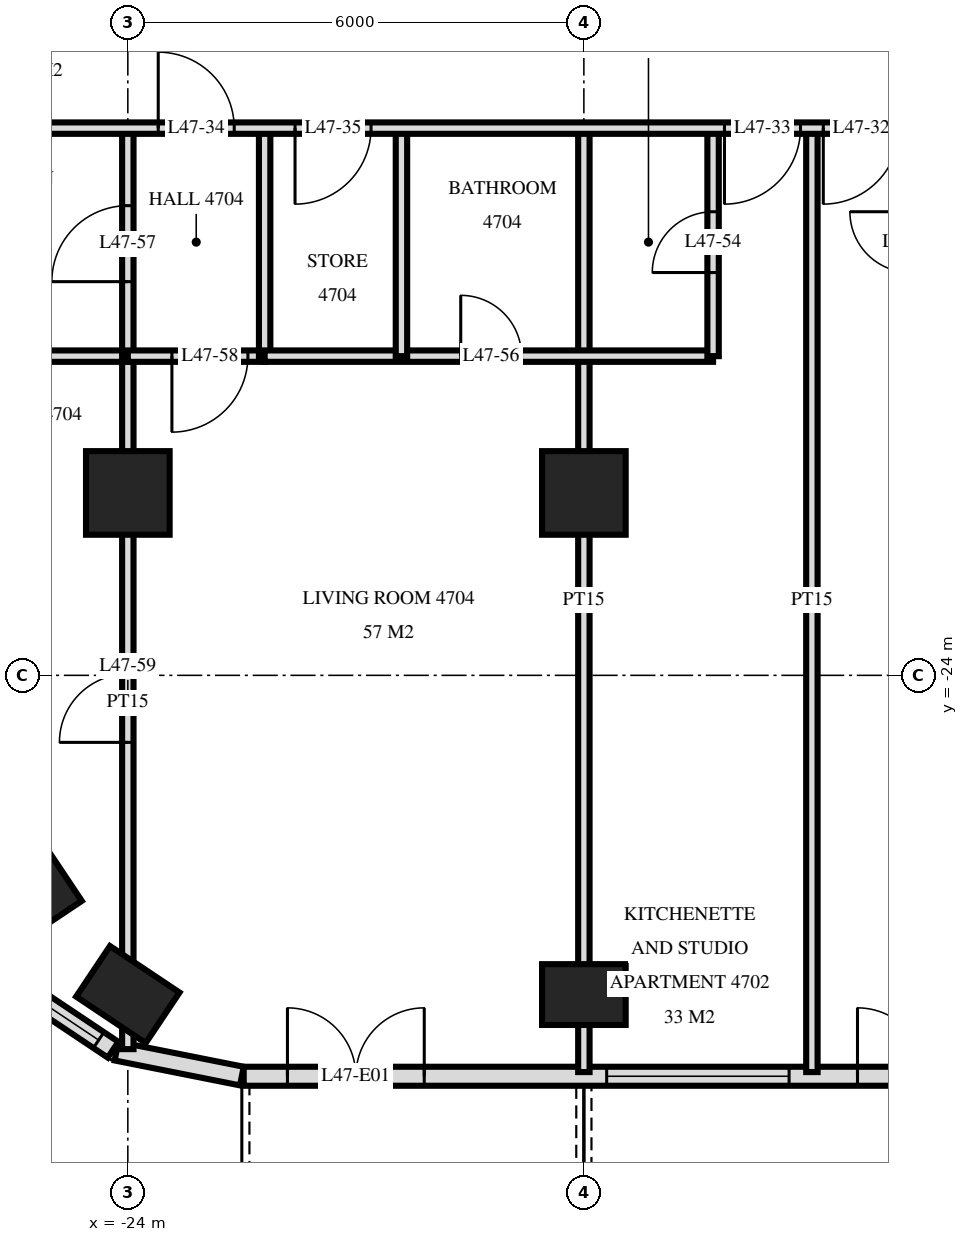
"""IFC4 building model, lengths in metres.
Left out: names, types, materials, properties, quantities, classifications, styles, units other than length and angle.
Written with IfcOpenShell. Run it as: python <this file> out.ifc"""

import sys

from ifc_helpers import new_model, si_unit, direction, frame, frame_2d, origin, origin_2d, place, context, subcontext, project, spatial, rectangle, extrude, element, fill, save


model = new_model("IFC4")
c1 = context("Model", 3, precision=1e-05, world=origin(), true_north=direction((0.0, 1.0)))
c2 = subcontext(c1, "Body", "Model", "MODEL_VIEW")
j1 = project(units=[si_unit("LENGTHUNIT", "METRE"), si_unit("PLANEANGLEUNIT", "RADIAN")], contexts=[c1])
p1 = place(None, origin())
s1 = spatial("IfcSite", under=j1, at=p1, CompositionType="ELEMENT")
p2 = place(p1, origin())
s2 = spatial("IfcBuilding", under=s1, at=p2, CompositionType="ELEMENT")
p3 = place(p2, frame((0.0, 0.0, 183.6)))
s3 = spatial("IfcBuildingStorey", under=s2, at=p3, CompositionType="ELEMENT", Elevation=183.6)
for number, where, z_axis, x_axis in (
    (1, (-25.244, -26.733, -0.28), (0.0, 0.0, 1.0), (-0.556, 0.831, 0.0)),
    (2, (-24.0, -28.2, -0.28), (0.0, 0.0, 1.0), (-0.831, 0.556, 0.0)),
):
    element("IfcColumn", number, at=place(p3, frame(where, z_axis=z_axis, x_axis=x_axis)), inside=s3, PredefinedType="COLUMN", context=c2, shape_type="SweptSolid", body=[
        extrude(rectangle(XDim=1.1, YDim=0.8, at=origin_2d()), origin(), (0.0, 0.0, 1.0), 3.78),
    ])
p4 = place(p3, frame((-24.0, -21.6, -0.28), z_axis=(0.0, 0.0, 1.0), x_axis=(1.0, 0.0, 0.0)))
e3 = element("IfcColumn", 3, at=p4, inside=s3, PredefinedType="COLUMN", context=c2, shape_type="SweptSolid", body=[
    extrude(rectangle(XDim=1.1, YDim=1.1, at=origin_2d()), origin(), (0.0, 0.0, 1.0), 3.78),
])
p5 = place(p3, frame((-18.0, -28.2, -0.28), z_axis=(0.0, 0.0, 1.0), x_axis=(1.0, 0.0, 0.0)))
e4 = element("IfcColumn", 4, at=p5, inside=s3, PredefinedType="COLUMN", context=c2, shape_type="SweptSolid", body=[
    extrude(rectangle(XDim=1.1, YDim=0.8, at=origin_2d()), origin(), (0.0, 0.0, 1.0), 3.78),
])
p6 = place(p3, frame((-18.0, -21.6, -0.28), z_axis=(0.0, 0.0, 1.0), x_axis=(1.0, 0.0, 0.0)))
e5 = element("IfcColumn", 5, at=p6, inside=s3, PredefinedType="COLUMN", context=c2, shape_type="SweptSolid", body=[
    extrude(rectangle(XDim=1.1, YDim=1.1, at=origin_2d()), origin(), (0.0, 0.0, 1.0), 3.78),
])
p7 = place(p3, frame((-25.571, -28.006, 0.0), z_axis=(0.0, 0.0, 1.0), x_axis=(0.831482937015, -0.55555029066, 0.0)))
e6 = element("IfcWall", 6, at=p7, inside=s3, PredefinedType="SOLIDWALL", context=c2, shape_type="SweptSolid", body=[
    extrude(rectangle(XDim=1.656, YDim=0.25, at=frame_2d((0.828, 0.0))), origin(), (0.0, 0.0, 1.0), 3.22),
])
p8 = place(p7, frame((0.228, 0.0, 0.9)))
e7 = element("IfcOpeningElement", 7, at=p8, cuts=e6, PredefinedType="OPENING", context=c2, shape_type="SweptSolid", body=[
    extrude(rectangle(XDim=1.2, YDim=1.5, at=frame_2d((0.6, 0.75))), frame((0.0, 0.135, 0.0), z_axis=(0.0, -1.0, 0.0), x_axis=(1.0, 0.0, 0.0)), (0.0, 0.0, 1.0), 0.27),
])
p9 = place(p3, frame((-24.149, -28.945, 0.0), z_axis=(0.0, 0.0, 1.0), x_axis=(0.980775640221, -0.19513878023, 0.0)))
e8 = element("IfcWall", 8, at=p9, inside=s3, PredefinedType="SOLIDWALL", context=c2, shape_type="SweptSolid", body=[
    extrude(rectangle(XDim=1.681, YDim=0.25, at=frame_2d((0.841, 0.0))), origin(), (0.0, 0.0, 1.0), 3.22),
])
p10 = place(p3, frame((-22.475, -29.275, 0.0), z_axis=(0.0, 0.0, 1.0), x_axis=(1.0, 0.0, 0.0)))
e9 = element("IfcWall", 9, at=p10, inside=s3, PredefinedType="SOLIDWALL", context=c2, shape_type="SweptSolid", body=[
    extrude(rectangle(XDim=44.951, YDim=0.25, at=frame_2d((22.475, 0.0))), origin(), (0.0, 0.0, 1.0), 3.22),
])
p11 = place(p10, frame((0.575, 0.0, 0.0)))
e10 = element("IfcOpeningElement", 10, at=p11, cuts=e9, PredefinedType="OPENING", context=c2, shape_type="SweptSolid", body=[
    extrude(rectangle(XDim=1.8, YDim=2.4, at=frame_2d((0.9, 1.2))), frame((0.0, 0.135, 0.0), z_axis=(0.0, -1.0, 0.0), x_axis=(1.0, 0.0, 0.0)), (0.0, 0.0, 1.0), 0.27),
])
p12 = place(p10, frame((4.775, 0.0, 0.9)))
e11 = element("IfcOpeningElement", 11, at=p12, cuts=e9, PredefinedType="OPENING", context=c2, shape_type="SweptSolid", body=[
    extrude(rectangle(XDim=2.4, YDim=1.5, at=frame_2d((1.2, 0.75))), frame((0.0, 0.135, 0.0), z_axis=(0.0, -1.0, 0.0), x_axis=(1.0, 0.0, 0.0)), (0.0, 0.0, 1.0), 0.27),
])
p13 = place(p10, frame((8.075, 0.0, 0.0)))
e12 = element("IfcOpeningElement", 12, at=p13, cuts=e9, PredefinedType="OPENING", context=c2, shape_type="SweptSolid", body=[
    extrude(rectangle(XDim=1.8, YDim=2.4, at=frame_2d((0.9, 1.2))), frame((0.0, 0.135, 0.0), z_axis=(0.0, -1.0, 0.0), x_axis=(1.0, 0.0, 0.0)), (0.0, 0.0, 1.0), 0.27),
])
p14 = place(p10, frame((11.075, 0.0, 0.0)))
e13 = element("IfcOpeningElement", 13, at=p14, cuts=e9, PredefinedType="OPENING", context=c2, shape_type="SweptSolid", body=[
    extrude(rectangle(XDim=1.8, YDim=2.4, at=frame_2d((0.9, 1.2))), frame((0.0, 0.135, 0.0), z_axis=(0.0, -1.0, 0.0), x_axis=(1.0, 0.0, 0.0)), (0.0, 0.0, 1.0), 0.27),
])
p15 = place(p10, frame((13.775, 0.0, 0.9)))
e14 = element("IfcOpeningElement", 14, at=p15, cuts=e9, PredefinedType="OPENING", context=c2, shape_type="SweptSolid", body=[
    extrude(rectangle(XDim=2.4, YDim=1.5, at=frame_2d((1.2, 0.75))), frame((0.0, 0.135, 0.0), z_axis=(0.0, -1.0, 0.0), x_axis=(1.0, 0.0, 0.0)), (0.0, 0.0, 1.0), 0.27),
])
p16 = place(p10, frame((20.075, 0.0, 0.0)))
e15 = element("IfcOpeningElement", 15, at=p16, cuts=e9, PredefinedType="OPENING", context=c2, shape_type="SweptSolid", body=[
    extrude(rectangle(XDim=1.8, YDim=2.4, at=frame_2d((0.9, 1.2))), frame((0.0, 0.135, 0.0), z_axis=(0.0, -1.0, 0.0), x_axis=(1.0, 0.0, 0.0)), (0.0, 0.0, 1.0), 0.27),
])
p17 = place(p10, frame((23.075, 0.0, 0.0)))
e16 = element("IfcOpeningElement", 16, at=p17, cuts=e9, PredefinedType="OPENING", context=c2, shape_type="SweptSolid", body=[
    extrude(rectangle(XDim=1.8, YDim=2.4, at=frame_2d((0.9, 1.2))), frame((0.0, 0.135, 0.0), z_axis=(0.0, -1.0, 0.0), x_axis=(1.0, 0.0, 0.0)), (0.0, 0.0, 1.0), 0.27),
])
p18 = place(p10, frame((29.075, 0.0, 0.0)))
e17 = element("IfcOpeningElement", 17, at=p18, cuts=e9, PredefinedType="OPENING", context=c2, shape_type="SweptSolid", body=[
    extrude(rectangle(XDim=1.8, YDim=2.4, at=frame_2d((0.9, 1.2))), frame((0.0, 0.135, 0.0), z_axis=(0.0, -1.0, 0.0), x_axis=(1.0, 0.0, 0.0)), (0.0, 0.0, 1.0), 0.27),
])
p19 = place(p10, frame((31.775, 0.0, 0.9)))
e18 = element("IfcOpeningElement", 18, at=p19, cuts=e9, PredefinedType="OPENING", context=c2, shape_type="SweptSolid", body=[
    extrude(rectangle(XDim=2.4, YDim=1.5, at=frame_2d((1.2, 0.75))), frame((0.0, 0.135, 0.0), z_axis=(0.0, -1.0, 0.0), x_axis=(1.0, 0.0, 0.0)), (0.0, 0.0, 1.0), 0.27),
])
p20 = place(p10, frame((35.075, 0.0, 0.0)))
e19 = element("IfcOpeningElement", 19, at=p20, cuts=e9, PredefinedType="OPENING", context=c2, shape_type="SweptSolid", body=[
    extrude(rectangle(XDim=1.8, YDim=2.4, at=frame_2d((0.9, 1.2))), frame((0.0, 0.135, 0.0), z_axis=(0.0, -1.0, 0.0), x_axis=(1.0, 0.0, 0.0)), (0.0, 0.0, 1.0), 0.27),
])
p21 = place(p10, frame((37.775, 0.0, 0.9)))
e20 = element("IfcOpeningElement", 20, at=p21, cuts=e9, PredefinedType="OPENING", context=c2, shape_type="SweptSolid", body=[
    extrude(rectangle(XDim=2.4, YDim=1.5, at=frame_2d((1.2, 0.75))), frame((0.0, 0.135, 0.0), z_axis=(0.0, -1.0, 0.0), x_axis=(1.0, 0.0, 0.0)), (0.0, 0.0, 1.0), 0.27),
])
p22 = place(p10, frame((41.075, 0.0, 0.0)))
e21 = element("IfcOpeningElement", 21, at=p22, cuts=e9, PredefinedType="OPENING", context=c2, shape_type="SweptSolid", body=[
    extrude(rectangle(XDim=1.8, YDim=2.4, at=frame_2d((0.9, 1.2))), frame((0.0, 0.135, 0.0), z_axis=(0.0, -1.0, 0.0), x_axis=(1.0, 0.0, 0.0)), (0.0, 0.0, 1.0), 0.27),
])
p23 = place(p3, frame((-15.0, -29.22, 0.0), z_axis=(0.0, 0.0, 1.0), x_axis=(0.0, 1.0, 0.0)))
e22 = element("IfcWall", 22, at=p23, inside=s3, PredefinedType="PARTITIONING", context=c2, shape_type="SweptSolid", body=[
    extrude(rectangle(XDim=12.42, YDim=0.15, at=frame_2d((6.21, 0.0))), origin(), (0.0, 0.0, 1.0), 3.22),
])
p24 = place(p3, frame((-16.3, -19.8, 0.0), z_axis=(0.0, 0.0, 1.0), x_axis=(0.0, 1.0, 0.0)))
e23 = element("IfcWall", 23, at=p24, inside=s3, PredefinedType="PARTITIONING", context=c2, shape_type="SweptSolid", body=[
    extrude(rectangle(XDim=3.0, YDim=0.15, at=frame_2d((1.5, 0.0))), origin(), (0.0, 0.0, 1.0), 3.22),
])
p25 = place(p24, frame((1.1, 0.0, 0.0)))
e24 = element("IfcOpeningElement", 24, at=p25, cuts=e23, PredefinedType="OPENING", context=c2, shape_type="SweptSolid", body=[
    extrude(rectangle(XDim=0.8, YDim=2.1, at=frame_2d((0.4, 1.05))), frame((0.0, 0.085, 0.0), z_axis=(0.0, -1.0, 0.0), x_axis=(1.0, 0.0, 0.0)), (0.0, 0.0, 1.0), 0.17),
])
p26 = place(p3, frame((-18.0, -29.22, 0.0), z_axis=(0.0, 0.0, 1.0), x_axis=(0.0, 1.0, 0.0)))
e25 = element("IfcWall", 25, at=p26, inside=s3, PredefinedType="PARTITIONING", context=c2, shape_type="SweptSolid", body=[
    extrude(rectangle(XDim=12.42, YDim=0.15, at=frame_2d((6.21, 0.0))), origin(), (0.0, 0.0, 1.0), 3.22),
])
for number, where, z_axis, x_axis in (
    (26, (-20.4, -19.8, 0.0), (0.0, 0.0, 1.0), (0.0, 1.0, 0.0)),
    (27, (-22.2, -19.8, 0.0), (0.0, 0.0, 1.0), (0.0, 1.0, 0.0)),
):
    element("IfcWall", number, at=place(p3, frame(where, z_axis=z_axis, x_axis=x_axis)), inside=s3, PredefinedType="PARTITIONING", context=c2, shape_type="SweptSolid", body=[
        extrude(rectangle(XDim=3.0, YDim=0.15, at=frame_2d((1.5, 0.0))), origin(), (0.0, 0.0, 1.0), 3.22),
    ])
p27 = place(p3, frame((-24.0, -19.8, 0.0), z_axis=(0.0, 0.0, 1.0), x_axis=(0.0, 1.0, 0.0)))
e28 = element("IfcWall", 28, at=p27, inside=s3, PredefinedType="PARTITIONING", context=c2, shape_type="SweptSolid", body=[
    extrude(rectangle(XDim=3.0, YDim=0.15, at=frame_2d((1.5, 0.0))), origin(), (0.0, 0.0, 1.0), 3.22),
])
p28 = place(p27, frame((0.98, 0.0, 0.0)))
e29 = element("IfcOpeningElement", 29, at=p28, cuts=e28, PredefinedType="OPENING", context=c2, shape_type="SweptSolid", body=[
    extrude(rectangle(XDim=1.0, YDim=2.1, at=frame_2d((0.5, 1.05))), frame((0.0, 0.085, 0.0), z_axis=(0.0, -1.0, 0.0), x_axis=(1.0, 0.0, 0.0)), (0.0, 0.0, 1.0), 0.17),
])
p29 = place(p3, frame((-24.0, -28.918, 0.0), z_axis=(0.0, 0.0, 1.0), x_axis=(0.0, 1.0, 0.0)))
e30 = element("IfcWall", 30, at=p29, inside=s3, PredefinedType="PARTITIONING", context=c2, shape_type="SweptSolid", body=[
    extrude(rectangle(XDim=9.118, YDim=0.15, at=frame_2d((4.559, 0.0))), origin(), (0.0, 0.0, 1.0), 3.22),
])
p30 = place(p29, frame((4.036, 0.0, 0.0)))
e31 = element("IfcOpeningElement", 31, at=p30, cuts=e30, PredefinedType="OPENING", context=c2, shape_type="SweptSolid", body=[
    extrude(rectangle(XDim=0.9, YDim=2.1, at=frame_2d((0.45, 1.05))), frame((0.0, 0.085, 0.0), z_axis=(0.0, -1.0, 0.0), x_axis=(1.0, 0.0, 0.0)), (0.0, 0.0, 1.0), 0.17),
])
p31 = place(p3, frame((-24.0, -19.8, 0.0), z_axis=(0.0, 0.0, 1.0), x_axis=(1.0, 0.0, 0.0)))
e32 = element("IfcWall", 32, at=p31, inside=s3, PredefinedType="PARTITIONING", context=c2, shape_type="SweptSolid", body=[
    extrude(rectangle(XDim=1.8, YDim=0.15, at=frame_2d((0.9, 0.0))), origin(), (0.0, 0.0, 1.0), 3.22),
])
p32 = place(p31, frame((0.58, 0.0, 0.0)))
e33 = element("IfcOpeningElement", 33, at=p32, cuts=e32, PredefinedType="OPENING", context=c2, shape_type="SweptSolid", body=[
    extrude(rectangle(XDim=1.0, YDim=2.1, at=frame_2d((0.5, 1.05))), frame((0.0, 0.085, 0.0), z_axis=(0.0, -1.0, 0.0), x_axis=(1.0, 0.0, 0.0)), (0.0, 0.0, 1.0), 0.17),
])
p33 = place(p3, frame((-26.82, -19.8, 0.0), z_axis=(0.0, 0.0, 1.0), x_axis=(1.0, 0.0, 0.0)))
e34 = element("IfcWall", 34, at=p33, inside=s3, PredefinedType="PARTITIONING", context=c2, shape_type="SweptSolid", body=[
    extrude(rectangle(XDim=2.82, YDim=0.15, at=frame_2d((1.41, 0.0))), origin(), (0.0, 0.0, 1.0), 3.22),
])
p34 = place(p3, frame((-22.2, -19.8, 0.0), z_axis=(0.0, 0.0, 1.0), x_axis=(1.0, 0.0, 0.0)))
e35 = element("IfcWall", 35, at=p34, inside=s3, PredefinedType="PARTITIONING", context=c2, shape_type="SweptSolid", body=[
    extrude(rectangle(XDim=5.9, YDim=0.15, at=frame_2d((2.95, 0.0))), origin(), (0.0, 0.0, 1.0), 3.22),
])
p35 = place(p34, frame((2.58, 0.0, 0.0)))
e36 = element("IfcOpeningElement", 36, at=p35, cuts=e35, PredefinedType="OPENING", context=c2, shape_type="SweptSolid", body=[
    extrude(rectangle(XDim=0.8, YDim=2.1, at=frame_2d((0.4, 1.05))), frame((0.0, 0.085, 0.0), z_axis=(0.0, -1.0, 0.0), x_axis=(1.0, 0.0, 0.0)), (0.0, 0.0, 1.0), 0.17),
])
p36 = place(p3, frame((-26.82, -16.8, 0.0), z_axis=(0.0, 0.0, 1.0), x_axis=(1.0, 0.0, 0.0)))
e37 = element("IfcWall", 37, at=p36, inside=s3, PredefinedType="PARTITIONING", context=c2, shape_type="SweptSolid", body=[
    extrude(rectangle(XDim=53.64, YDim=0.15, at=frame_2d((26.82, 0.0))), origin(), (0.0, 0.0, 1.0), 3.22),
])
p37 = place(p36, frame((11.97, 0.0, 0.0)))
e38 = element("IfcOpeningElement", 38, at=p37, cuts=e37, PredefinedType="OPENING", context=c2, shape_type="SweptSolid", body=[
    extrude(rectangle(XDim=1.0, YDim=2.1, at=frame_2d((0.5, 1.05))), frame((0.0, 0.085, 0.0), z_axis=(0.0, -1.0, 0.0), x_axis=(1.0, 0.0, 0.0)), (0.0, 0.0, 1.0), 0.17),
])
p38 = place(p36, frame((10.67, 0.0, 0.0)))
e39 = element("IfcOpeningElement", 39, at=p38, cuts=e37, PredefinedType="OPENING", context=c2, shape_type="SweptSolid", body=[
    extrude(rectangle(XDim=1.0, YDim=2.1, at=frame_2d((0.5, 1.05))), frame((0.0, 0.085, 0.0), z_axis=(0.0, -1.0, 0.0), x_axis=(1.0, 0.0, 0.0)), (0.0, 0.0, 1.0), 0.17),
])
p39 = place(p36, frame((3.22, 0.0, 0.0)))
e40 = element("IfcOpeningElement", 40, at=p39, cuts=e37, PredefinedType="OPENING", context=c2, shape_type="SweptSolid", body=[
    extrude(rectangle(XDim=1.0, YDim=2.1, at=frame_2d((0.5, 1.05))), frame((0.0, 0.085, 0.0), z_axis=(0.0, -1.0, 0.0), x_axis=(1.0, 0.0, 0.0)), (0.0, 0.0, 1.0), 0.17),
])
p40 = place(p36, frame((5.02, 0.0, 0.0)))
e41 = element("IfcOpeningElement", 41, at=p40, cuts=e37, PredefinedType="OPENING", context=c2, shape_type="SweptSolid", body=[
    extrude(rectangle(XDim=1.0, YDim=2.1, at=frame_2d((0.5, 1.05))), frame((0.0, 0.085, 0.0), z_axis=(0.0, -1.0, 0.0), x_axis=(1.0, 0.0, 0.0)), (0.0, 0.0, 1.0), 0.17),
])
p41 = place(p36, frame((38.97, 0.0, 0.0)))
e42 = element("IfcOpeningElement", 42, at=p41, cuts=e37, PredefinedType="OPENING", context=c2, shape_type="SweptSolid", body=[
    extrude(rectangle(XDim=1.0, YDim=2.1, at=frame_2d((0.5, 1.05))), frame((0.0, 0.085, 0.0), z_axis=(0.0, -1.0, 0.0), x_axis=(1.0, 0.0, 0.0)), (0.0, 0.0, 1.0), 0.17),
])
p42 = place(p36, frame((48.72, 0.0, 0.0)))
e43 = element("IfcOpeningElement", 43, at=p42, cuts=e37, PredefinedType="OPENING", context=c2, shape_type="SweptSolid", body=[
    extrude(rectangle(XDim=1.0, YDim=2.1, at=frame_2d((0.5, 1.05))), frame((0.0, 0.085, 0.0), z_axis=(0.0, -1.0, 0.0), x_axis=(1.0, 0.0, 0.0)), (0.0, 0.0, 1.0), 0.17),
])
p43 = place(p36, frame((46.92, 0.0, 0.0)))
e44 = element("IfcOpeningElement", 44, at=p43, cuts=e37, PredefinedType="OPENING", context=c2, shape_type="SweptSolid", body=[
    extrude(rectangle(XDim=1.0, YDim=2.1, at=frame_2d((0.5, 1.05))), frame((0.0, 0.085, 0.0), z_axis=(0.0, -1.0, 0.0), x_axis=(1.0, 0.0, 0.0)), (0.0, 0.0, 1.0), 0.17),
])
p44 = place(p36, frame((18.32, 0.0, 0.0)))
e45 = element("IfcOpeningElement", 45, at=p44, cuts=e37, PredefinedType="OPENING", context=c2, shape_type="SweptSolid", body=[
    extrude(rectangle(XDim=1.0, YDim=2.1, at=frame_2d((0.5, 1.05))), frame((0.0, 0.085, 0.0), z_axis=(0.0, -1.0, 0.0), x_axis=(1.0, 0.0, 0.0)), (0.0, 0.0, 1.0), 0.17),
])
p45 = place(p36, frame((26.32, 0.0, 0.0)))
e46 = element("IfcOpeningElement", 46, at=p45, cuts=e37, PredefinedType="OPENING", context=c2, shape_type="SweptSolid", body=[
    extrude(rectangle(XDim=1.0, YDim=2.1, at=frame_2d((0.5, 1.05))), frame((0.0, 0.085, 0.0), z_axis=(0.0, -1.0, 0.0), x_axis=(1.0, 0.0, 0.0)), (0.0, 0.0, 1.0), 0.17),
])
p46 = place(p36, frame((34.32, 0.0, 0.0)))
e47 = element("IfcOpeningElement", 47, at=p46, cuts=e37, PredefinedType="OPENING", context=c2, shape_type="SweptSolid", body=[
    extrude(rectangle(XDim=1.0, YDim=2.1, at=frame_2d((0.5, 1.05))), frame((0.0, 0.085, 0.0), z_axis=(0.0, -1.0, 0.0), x_axis=(1.0, 0.0, 0.0)), (0.0, 0.0, 1.0), 0.17),
])
p47 = place(p8, origin())
e48 = element("IfcWindow", 48, at=p47, inside=s3, PartitioningType="SINGLE_PANEL", PredefinedType="WINDOW", context=c2, shape_type="SweptSolid", body=[
    extrude(rectangle(XDim=1.2, YDim=1.5, at=frame_2d((0.6, 0.75))), frame((0.0, 0.03, 0.0), z_axis=(0.0, -1.0, 0.0), x_axis=(1.0, 0.0, 0.0)), (0.0, 0.0, 1.0), 0.06),
])
fill(e7, e48)
p48 = place(p11, origin())
e49 = element("IfcDoor", 49, at=p48, inside=s3, OperationType="DOUBLE_DOOR_SINGLE_SWING", PredefinedType="DOOR", context=c2, shape_type="SweptSolid", body=[
    extrude(rectangle(XDim=1.8, YDim=2.4, at=frame_2d((0.9, 1.2))), frame((0.0, 0.025, 0.0), z_axis=(0.0, -1.0, 0.0), x_axis=(1.0, 0.0, 0.0)), (0.0, 0.0, 1.0), 0.05),
])
fill(e10, e49)
p49 = place(p12, origin())
e50 = element("IfcWindow", 50, at=p49, inside=s3, PartitioningType="SINGLE_PANEL", PredefinedType="WINDOW", context=c2, shape_type="SweptSolid", body=[
    extrude(rectangle(XDim=2.4, YDim=1.5, at=frame_2d((1.2, 0.75))), frame((0.0, 0.03, 0.0), z_axis=(0.0, -1.0, 0.0), x_axis=(1.0, 0.0, 0.0)), (0.0, 0.0, 1.0), 0.06),
])
fill(e11, e50)
p50 = place(p13, origin())
e51 = element("IfcDoor", 51, at=p50, inside=s3, OperationType="DOUBLE_DOOR_SINGLE_SWING", PredefinedType="DOOR", context=c2, shape_type="SweptSolid", body=[
    extrude(rectangle(XDim=1.8, YDim=2.4, at=frame_2d((0.9, 1.2))), frame((0.0, 0.025, 0.0), z_axis=(0.0, -1.0, 0.0), x_axis=(1.0, 0.0, 0.0)), (0.0, 0.0, 1.0), 0.05),
])
fill(e12, e51)
p51 = place(p37, frame((0.5, 0.0, 0.0), z_axis=(0.0, 0.0, 1.0), x_axis=(-1.0, 0.0, 0.0)))
e52 = element("IfcDoor", 52, at=p51, inside=s3, OperationType="SINGLE_SWING_LEFT", PredefinedType="DOOR", context=c2, shape_type="SweptSolid", body=[
    extrude(rectangle(XDim=1.0, YDim=2.1, at=frame_2d((0.0, 1.05))), frame((0.0, -0.025, 0.0), z_axis=(0.0, 1.0, 0.0), x_axis=(-1.0, 0.0, 0.0)), (0.0, 0.0, 1.0), 0.05),
])
fill(e38, e52)
p52 = place(p38, frame((0.5, 0.0, 0.0), z_axis=(0.0, 0.0, 1.0), x_axis=(-1.0, 0.0, 0.0)))
e53 = element("IfcDoor", 53, at=p52, inside=s3, OperationType="SINGLE_SWING_LEFT", PredefinedType="DOOR", context=c2, shape_type="SweptSolid", body=[
    extrude(rectangle(XDim=1.0, YDim=2.1, at=frame_2d((0.0, 1.05))), frame((0.0, -0.025, 0.0), z_axis=(0.0, 1.0, 0.0), x_axis=(-1.0, 0.0, 0.0)), (0.0, 0.0, 1.0), 0.05),
])
fill(e39, e53)
p53 = place(p39, origin())
e54 = element("IfcDoor", 54, at=p53, inside=s3, OperationType="SINGLE_SWING_RIGHT", PredefinedType="DOOR", context=c2, shape_type="SweptSolid", body=[
    extrude(rectangle(XDim=1.0, YDim=2.1, at=frame_2d((0.5, 1.05))), frame((0.0, 0.025, 0.0), z_axis=(0.0, -1.0, 0.0), x_axis=(1.0, 0.0, 0.0)), (0.0, 0.0, 1.0), 0.05),
])
fill(e40, e54)
p54 = place(p40, frame((0.5, 0.0, 0.0), z_axis=(0.0, 0.0, 1.0), x_axis=(-1.0, 0.0, 0.0)))
e55 = element("IfcDoor", 55, at=p54, inside=s3, OperationType="SINGLE_SWING_LEFT", PredefinedType="DOOR", context=c2, shape_type="SweptSolid", body=[
    extrude(rectangle(XDim=1.0, YDim=2.1, at=frame_2d((0.0, 1.05))), frame((0.0, -0.025, 0.0), z_axis=(0.0, 1.0, 0.0), x_axis=(-1.0, 0.0, 0.0)), (0.0, 0.0, 1.0), 0.05),
])
fill(e41, e55)
p55 = place(p25, origin())
e56 = element("IfcDoor", 56, at=p55, inside=s3, OperationType="SINGLE_SWING_RIGHT", PredefinedType="DOOR", context=c2, shape_type="SweptSolid", body=[
    extrude(rectangle(XDim=0.8, YDim=2.1, at=frame_2d((0.4, 1.05))), frame((0.0, 0.025, 0.0), z_axis=(0.0, -1.0, 0.0), x_axis=(1.0, 0.0, 0.0)), (0.0, 0.0, 1.0), 0.05),
])
fill(e24, e56)
p56 = place(p35, origin())
e57 = element("IfcDoor", 57, at=p56, inside=s3, OperationType="SINGLE_SWING_RIGHT", PredefinedType="DOOR", context=c2, shape_type="SweptSolid", body=[
    extrude(rectangle(XDim=0.8, YDim=2.1, at=frame_2d((0.4, 1.05))), frame((0.0, 0.025, 0.0), z_axis=(0.0, -1.0, 0.0), x_axis=(1.0, 0.0, 0.0)), (0.0, 0.0, 1.0), 0.05),
])
fill(e36, e57)
p57 = place(p28, origin())
e58 = element("IfcDoor", 58, at=p57, inside=s3, OperationType="SINGLE_SWING_RIGHT", PredefinedType="DOOR", context=c2, shape_type="SweptSolid", body=[
    extrude(rectangle(XDim=1.0, YDim=2.1, at=frame_2d((0.5, 1.05))), frame((0.0, 0.025, 0.0), z_axis=(0.0, -1.0, 0.0), x_axis=(1.0, 0.0, 0.0)), (0.0, 0.0, 1.0), 0.05),
])
fill(e29, e58)
p58 = place(p32, frame((0.5, 0.0, 0.0), z_axis=(0.0, 0.0, 1.0), x_axis=(-1.0, 0.0, 0.0)))
e59 = element("IfcDoor", 59, at=p58, inside=s3, OperationType="SINGLE_SWING_LEFT", PredefinedType="DOOR", context=c2, shape_type="SweptSolid", body=[
    extrude(rectangle(XDim=1.0, YDim=2.1, at=frame_2d((0.0, 1.05))), frame((0.0, -0.025, 0.0), z_axis=(0.0, 1.0, 0.0), x_axis=(-1.0, 0.0, 0.0)), (0.0, 0.0, 1.0), 0.05),
])
fill(e33, e59)
p59 = place(p30, origin())
e60 = element("IfcDoor", 60, at=p59, inside=s3, OperationType="SINGLE_SWING_RIGHT", PredefinedType="DOOR", context=c2, shape_type="SweptSolid", body=[
    extrude(rectangle(XDim=0.9, YDim=2.1, at=frame_2d((0.45, 1.05))), frame((0.0, 0.025, 0.0), z_axis=(0.0, -1.0, 0.0), x_axis=(1.0, 0.0, 0.0)), (0.0, 0.0, 1.0), 0.05),
])
fill(e31, e60)
save(model, sys.argv[1])
